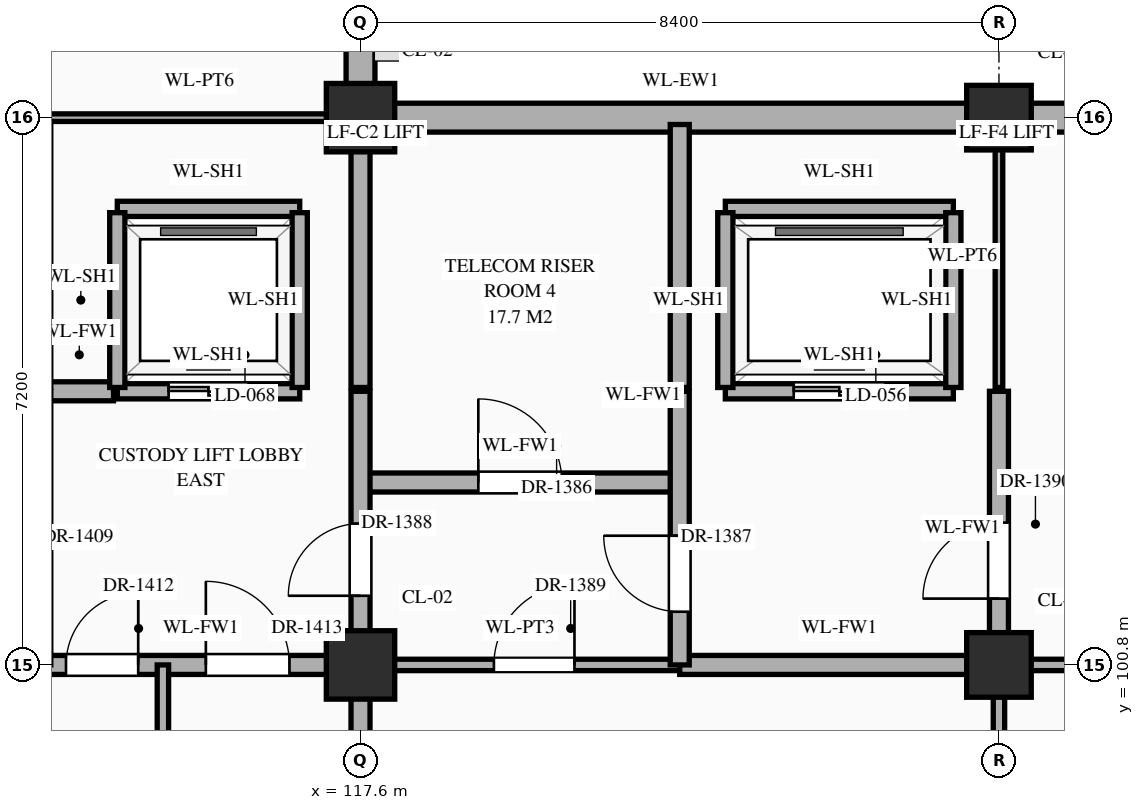
"""IFC4 building model, lengths in metres.
Left out: names, types, materials, properties, quantities, classifications, styles, units other than length and angle.
Written with IfcOpenShell. Run it as: python <this file> out.ifc"""

import sys

from ifc_helpers import new_model, si_unit, direction, frame, frame_2d, origin, origin_2d, place, context, subcontext, project, spatial, rectangle, extrude, element, fill, save


model = new_model("IFC4")
c1 = context("Model", 3, precision=1e-05, world=origin(), true_north=direction((0.0, 1.0)))
c2 = subcontext(c1, "Body", "Model", "MODEL_VIEW")
j1 = project(units=[si_unit("LENGTHUNIT", "METRE"), si_unit("PLANEANGLEUNIT", "RADIAN")], contexts=[c1])
p1 = place(None, origin())
s1 = spatial("IfcSite", under=j1, at=p1, CompositionType="ELEMENT")
p2 = place(p1, origin())
s2 = spatial("IfcBuilding", under=s1, at=p2, CompositionType="ELEMENT")
p3 = place(p2, frame((0.0, 0.0, 10.8)))
s3 = spatial("IfcBuildingStorey", under=s2, at=p3, CompositionType="ELEMENT", Elevation=10.8)
for number, where, z_axis, x_axis in (
    (1, (117.6, 100.8, 0.0), (0.0, 0.0, 1.0), (1.0, 0.0, 0.0)),
    (2, (117.6, 108.0, 0.0), (0.0, 0.0, 1.0), (1.0, 0.0, 0.0)),
):
    element("IfcColumn", number, at=place(p3, frame(where, z_axis=z_axis, x_axis=x_axis)), inside=s3, PredefinedType="COLUMN", context=c2, shape_type="SweptSolid", body=[
        extrude(rectangle(XDim=0.9, YDim=0.9, at=origin_2d()), origin(), (0.0, 0.0, 1.0), 5.4),
    ])
for number, where, z_axis, x_axis in (
    (3, (126.0, 100.8, 0.0), (0.0, 0.0, 1.0), (1.0, 0.0, 0.0)),
    (4, (126.0, 108.0, 0.0), (0.0, 0.0, 1.0), (1.0, 0.0, 0.0)),
):
    element("IfcColumn", number, at=place(p3, frame(where, z_axis=z_axis, x_axis=x_axis)), inside=s3, PredefinedType="COLUMN", context=c2, shape_type="SweptSolid", body=[
        extrude(rectangle(XDim=0.85, YDim=0.85, at=origin_2d()), origin(), (0.0, 0.0, 1.0), 5.4),
    ])
p4 = place(p3, frame((117.6, 108.445, 0.0), z_axis=(0.0, 0.0, 1.0), x_axis=(0.0, 1.0, 0.0)))
e5 = element("IfcWall", 5, at=p4, inside=s3, PredefinedType="STANDARD", context=c2, shape_type="SweptSolid", body=[
    extrude(rectangle(XDim=6.335, YDim=0.38, at=frame_2d((3.167, 0.0))), origin(), (0.0, 0.0, 1.0), 4.47),
])
p5 = place(p4, frame((3.855, 0.0, 0.85)))
e6 = element("IfcOpeningElement", 6, at=p5, cuts=e5, PredefinedType="OPENING", context=c2, shape_type="SweptSolid", body=[
    extrude(rectangle(XDim=1.2, YDim=1.56, at=frame_2d((0.6, 0.78))), frame((0.0, 0.202, 0.0), z_axis=(0.0, -1.0, 0.0), x_axis=(1.0, 0.0, 0.0)), (0.0, 0.0, 1.0), 0.404),
])
p6 = place(p3, frame((118.045, 108.0, 0.0), z_axis=(0.0, 0.0, 1.0), x_axis=(1.0, 0.0, 0.0)))
e7 = element("IfcWall", 7, at=p6, inside=s3, PredefinedType="STANDARD", context=c2, shape_type="SweptSolid", body=[
    extrude(rectangle(XDim=7.535, YDim=0.38, at=frame_2d((3.768, 0.0))), origin(), (0.0, 0.0, 1.0), 4.47),
])
p7 = place(p3, frame((126.42, 108.0, 0.0), z_axis=(0.0, 0.0, 1.0), x_axis=(1.0, 0.0, 0.0)))
e8 = element("IfcWall", 8, at=p7, inside=s3, PredefinedType="STANDARD", context=c2, shape_type="SweptSolid", body=[
    extrude(rectangle(XDim=7.56, YDim=0.38, at=frame_2d((3.78, 0.0))), origin(), (0.0, 0.0, 1.0), 4.47),
])
p8 = place(p7, frame((5.105, 0.0, 0.85)))
e9 = element("IfcOpeningElement", 9, at=p8, cuts=e8, PredefinedType="OPENING", context=c2, shape_type="SweptSolid", body=[
    extrude(rectangle(XDim=1.35, YDim=1.2, at=frame_2d((0.675, 0.6))), frame((0.0, 0.202, 0.0), z_axis=(0.0, -1.0, 0.0), x_axis=(1.0, 0.0, 0.0)), (0.0, 0.0, 1.0), 0.404),
])
p9 = place(p3, frame((113.4, 100.8, 0.0), z_axis=(0.0, 0.0, 1.0), x_axis=(1.0, 0.0, 0.0)))
e10 = element("IfcWall", 10, at=p9, inside=s3, PredefinedType="STANDARD", context=c2, shape_type="SweptSolid", body=[
    extrude(rectangle(XDim=4.2, YDim=0.25, at=frame_2d((2.1, 0.0))), origin(), (0.0, 0.0, 1.0), 4.27),
])
p10 = place(p9, frame((0.325, 0.0, 0.0)))
e11 = element("IfcOpeningElement", 11, at=p10, cuts=e10, PredefinedType="OPENING", context=c2, shape_type="SweptSolid", body=[
    extrude(rectangle(XDim=0.95, YDim=2.15, at=frame_2d((0.475, 1.075))), frame((0.0, 0.137, 0.0), z_axis=(0.0, -1.0, 0.0), x_axis=(1.0, 0.0, 0.0)), (0.0, 0.0, 1.0), 0.274),
])
p11 = place(p9, frame((2.165, 0.0, 0.0)))
e12 = element("IfcOpeningElement", 12, at=p11, cuts=e10, PredefinedType="OPENING", context=c2, shape_type="SweptSolid", body=[
    extrude(rectangle(XDim=1.1, YDim=2.2, at=frame_2d((0.55, 1.1))), frame((0.0, 0.137, 0.0), z_axis=(0.0, -1.0, 0.0), x_axis=(1.0, 0.0, 0.0)), (0.0, 0.0, 1.0), 0.274),
])
p12 = place(p3, frame((117.6, 100.8, 0.0), z_axis=(0.0, 0.0, 1.0), x_axis=(1.0, 0.0, 0.0)))
e13 = element("IfcWall", 13, at=p12, inside=s3, PredefinedType="STANDARD", context=c2, shape_type="SweptSolid", body=[
    extrude(rectangle(XDim=4.2, YDim=0.15, at=frame_2d((2.1, 0.0))), origin(), (0.0, 0.0, 1.0), 4.27),
])
p13 = place(p12, frame((1.755, 0.0, 0.0)))
e14 = element("IfcOpeningElement", 14, at=p13, cuts=e13, PredefinedType="OPENING", context=c2, shape_type="SweptSolid", body=[
    extrude(rectangle(XDim=1.06, YDim=2.4, at=frame_2d((0.53, 1.2))), frame((0.0, 0.087, 0.0), z_axis=(0.0, -1.0, 0.0), x_axis=(1.0, 0.0, 0.0)), (0.0, 0.0, 1.0), 0.174),
])
p14 = place(p3, frame((121.8, 100.8, 0.0), z_axis=(0.0, 0.0, 1.0), x_axis=(1.0, 0.0, 0.0)))
e15 = element("IfcWall", 15, at=p14, inside=s3, PredefinedType="STANDARD", context=c2, shape_type="SweptSolid", body=[
    extrude(rectangle(XDim=4.2, YDim=0.25, at=frame_2d((2.1, 0.0))), origin(), (0.0, 0.0, 1.0), 4.27),
])
p15 = place(p3, frame((126.0, 100.8, 0.0), z_axis=(0.0, 0.0, 1.0), x_axis=(1.0, 0.0, 0.0)))
e16 = element("IfcWall", 16, at=p15, inside=s3, PredefinedType="STANDARD", context=c2, shape_type="SweptSolid", body=[
    extrude(rectangle(XDim=8.4, YDim=0.15, at=frame_2d((4.2, 0.0))), origin(), (0.0, 0.0, 1.0), 4.27),
])
p16 = place(p15, frame((3.62, 0.0, 0.0)))
e17 = element("IfcOpeningElement", 17, at=p16, cuts=e16, PredefinedType="OPENING", context=c2, shape_type="SweptSolid", body=[
    extrude(rectangle(XDim=1.16, YDim=2.3, at=frame_2d((0.58, 1.15))), frame((0.0, 0.087, 0.0), z_axis=(0.0, -1.0, 0.0), x_axis=(1.0, 0.0, 0.0)), (0.0, 0.0, 1.0), 0.174),
])
p17 = place(p3, frame((117.6, 103.2, 0.0), z_axis=(0.0, 0.0, 1.0), x_axis=(1.0, 0.0, 0.0)))
e18 = element("IfcWall", 18, at=p17, inside=s3, PredefinedType="STANDARD", context=c2, shape_type="SweptSolid", body=[
    extrude(rectangle(XDim=4.2, YDim=0.25, at=frame_2d((2.1, 0.0))), origin(), (0.0, 0.0, 1.0), 5.12),
])
p18 = place(p17, frame((1.55, 0.0, 0.0)))
e19 = element("IfcOpeningElement", 19, at=p18, cuts=e18, PredefinedType="OPENING", context=c2, shape_type="SweptSolid", body=[
    extrude(rectangle(XDim=1.1, YDim=2.2, at=frame_2d((0.55, 1.1))), frame((0.0, 0.137, 0.0), z_axis=(0.0, -1.0, 0.0), x_axis=(1.0, 0.0, 0.0)), (0.0, 0.0, 1.0), 0.274),
])
p19 = place(p3, frame((126.0, 103.2, 0.0), z_axis=(0.0, 0.0, 1.0), x_axis=(1.0, 0.0, 0.0)))
e20 = element("IfcWall", 20, at=p19, inside=s3, PredefinedType="STANDARD", context=c2, shape_type="SweptSolid", body=[
    extrude(rectangle(XDim=41.96, YDim=0.1, at=frame_2d((20.98, 0.0))), origin(), (0.0, 0.0, 1.0), 5.12),
])
p20 = place(p19, frame((3.72, 0.0, 0.0)))
e21 = element("IfcOpeningElement", 21, at=p20, cuts=e20, PredefinedType="OPENING", context=c2, shape_type="SweptSolid", body=[
    extrude(rectangle(XDim=0.96, YDim=2.2, at=frame_2d((0.48, 1.1))), frame((0.0, 0.062, 0.0), z_axis=(0.0, -1.0, 0.0), x_axis=(1.0, 0.0, 0.0)), (0.0, 0.0, 1.0), 0.124),
])
p21 = place(p19, frame((12.1, 0.0, 0.0)))
e22 = element("IfcOpeningElement", 22, at=p21, cuts=e20, PredefinedType="OPENING", context=c2, shape_type="SweptSolid", body=[
    extrude(rectangle(XDim=1.0, YDim=2.25, at=frame_2d((0.5, 1.125))), frame((0.0, 0.062, 0.0), z_axis=(0.0, -1.0, 0.0), x_axis=(1.0, 0.0, 0.0)), (0.0, 0.0, 1.0), 0.124),
])
p22 = place(p19, frame((20.48, 0.0, 0.0)))
e23 = element("IfcOpeningElement", 23, at=p22, cuts=e20, PredefinedType="OPENING", context=c2, shape_type="SweptSolid", body=[
    extrude(rectangle(XDim=1.04, YDim=2.2, at=frame_2d((0.52, 1.1))), frame((0.0, 0.062, 0.0), z_axis=(0.0, -1.0, 0.0), x_axis=(1.0, 0.0, 0.0)), (0.0, 0.0, 1.0), 0.124),
])
p23 = place(p19, frame((28.86, 0.0, 0.0)))
e24 = element("IfcOpeningElement", 24, at=p23, cuts=e20, PredefinedType="OPENING", context=c2, shape_type="SweptSolid", body=[
    extrude(rectangle(XDim=1.08, YDim=2.25, at=frame_2d((0.54, 1.125))), frame((0.0, 0.062, 0.0), z_axis=(0.0, -1.0, 0.0), x_axis=(1.0, 0.0, 0.0)), (0.0, 0.0, 1.0), 0.124),
])
p24 = place(p19, frame((37.22, 0.0, 0.0)))
e25 = element("IfcOpeningElement", 25, at=p24, cuts=e20, PredefinedType="OPENING", context=c2, shape_type="SweptSolid", body=[
    extrude(rectangle(XDim=1.12, YDim=2.25, at=frame_2d((0.56, 1.125))), frame((0.0, 0.062, 0.0), z_axis=(0.0, -1.0, 0.0), x_axis=(1.0, 0.0, 0.0)), (0.0, 0.0, 1.0), 0.124),
])
p25 = place(p3, frame((113.45, 104.4, 0.0), z_axis=(0.0, 0.0, 1.0), x_axis=(1.0, 0.0, 0.0)))
e26 = element("IfcWall", 26, at=p25, inside=s3, PredefinedType="STANDARD", context=c2, shape_type="SweptSolid", body=[
    extrude(rectangle(XDim=0.9, YDim=0.25, at=frame_2d((0.45, 0.0))), origin(), (0.0, 0.0, 1.0), 5.12),
])
p26 = place(p3, frame((114.4, 104.4, 0.0), z_axis=(0.0, 0.0, 1.0), x_axis=(1.0, 0.0, 0.0)))
e27 = element("IfcWall", 27, at=p26, inside=s3, PredefinedType="STANDARD", context=c2, shape_type="SweptSolid", body=[
    extrude(rectangle(XDim=2.4, YDim=0.2, at=frame_2d((1.2, 0.0))), origin(), (0.0, 0.0, 1.0), 5.12),
])
p27 = place(p26, frame((0.675, 0.0, 0.0)))
e28 = element("IfcOpeningElement", 28, at=p27, cuts=e27, PredefinedType="OPENING", context=c2, shape_type="SweptSolid", body=[
    extrude(rectangle(XDim=1.05, YDim=2.15, at=frame_2d((0.525, 1.075))), frame((0.0, 0.112, 0.0), z_axis=(0.0, -1.0, 0.0), x_axis=(1.0, 0.0, 0.0)), (0.0, 0.0, 1.0), 0.224),
])
p28 = place(p3, frame((122.4, 104.4, 0.0), z_axis=(0.0, 0.0, 1.0), x_axis=(1.0, 0.0, 0.0)))
e29 = element("IfcWall", 29, at=p28, inside=s3, PredefinedType="STANDARD", context=c2, shape_type="SweptSolid", body=[
    extrude(rectangle(XDim=3.0, YDim=0.2, at=frame_2d((1.5, 0.0))), origin(), (0.0, 0.0, 1.0), 5.12),
])
p29 = place(p28, frame((0.9, 0.0, 0.0)))
e30 = element("IfcOpeningElement", 30, at=p29, cuts=e29, PredefinedType="OPENING", context=c2, shape_type="SweptSolid", body=[
    extrude(rectangle(XDim=1.2, YDim=2.15, at=frame_2d((0.6, 1.075))), frame((0.0, 0.112, 0.0), z_axis=(0.0, -1.0, 0.0), x_axis=(1.0, 0.0, 0.0)), (0.0, 0.0, 1.0), 0.224),
])
p30 = place(p3, frame((114.4, 106.8, 0.0), z_axis=(0.0, 0.0, 1.0), x_axis=(1.0, 0.0, 0.0)))
e31 = element("IfcWall", 31, at=p30, inside=s3, PredefinedType="STANDARD", context=c2, shape_type="SweptSolid", body=[
    extrude(rectangle(XDim=2.4, YDim=0.2, at=frame_2d((1.2, 0.0))), origin(), (0.0, 0.0, 1.0), 5.12),
])
p31 = place(p3, frame((122.4, 106.8, 0.0), z_axis=(0.0, 0.0, 1.0), x_axis=(1.0, 0.0, 0.0)))
e32 = element("IfcWall", 32, at=p31, inside=s3, PredefinedType="STANDARD", context=c2, shape_type="SweptSolid", body=[
    extrude(rectangle(XDim=3.0, YDim=0.2, at=frame_2d((1.5, 0.0))), origin(), (0.0, 0.0, 1.0), 5.12),
])
p32 = place(p3, frame((113.45, 108.0, 0.0), z_axis=(0.0, 0.0, 1.0), x_axis=(1.0, 0.0, 0.0)))
e33 = element("IfcWall", 33, at=p32, inside=s3, PredefinedType="STANDARD", context=c2, shape_type="SweptSolid", body=[
    extrude(rectangle(XDim=4.06, YDim=0.1, at=frame_2d((2.03, 0.0))), origin(), (0.0, 0.0, 1.0), 4.27),
])
p33 = place(p3, frame((114.4, 104.45, 0.0), z_axis=(0.0, 0.0, 1.0), x_axis=(0.0, 1.0, 0.0)))
e34 = element("IfcWall", 34, at=p33, inside=s3, PredefinedType="STANDARD", context=c2, shape_type="SweptSolid", body=[
    extrude(rectangle(XDim=2.3, YDim=0.2, at=frame_2d((1.15, 0.0))), origin(), (0.0, 0.0, 1.0), 5.12),
])
p34 = place(p3, frame((115.0, 96.0, 0.0), z_axis=(0.0, 0.0, 1.0), x_axis=(0.0, 1.0, 0.0)))
e35 = element("IfcWall", 35, at=p34, inside=s3, PredefinedType="STANDARD", context=c2, shape_type="SweptSolid", body=[
    extrude(rectangle(XDim=4.8, YDim=0.15, at=frame_2d((2.4, 0.0))), origin(), (0.0, 0.0, 1.0), 5.12),
])
p35 = place(p34, frame((1.82, 0.0, 0.0)))
e36 = element("IfcOpeningElement", 36, at=p35, cuts=e35, PredefinedType="OPENING", context=c2, shape_type="SweptSolid", body=[
    extrude(rectangle(XDim=1.16, YDim=2.3, at=frame_2d((0.58, 1.15))), frame((0.0, 0.087, 0.0), z_axis=(0.0, -1.0, 0.0), x_axis=(1.0, 0.0, 0.0)), (0.0, 0.0, 1.0), 0.174),
])
p36 = place(p3, frame((116.8, 104.45, 0.0), z_axis=(0.0, 0.0, 1.0), x_axis=(0.0, 1.0, 0.0)))
e37 = element("IfcWall", 37, at=p36, inside=s3, PredefinedType="STANDARD", context=c2, shape_type="SweptSolid", body=[
    extrude(rectangle(XDim=2.3, YDim=0.2, at=frame_2d((1.15, 0.0))), origin(), (0.0, 0.0, 1.0), 5.12),
])
p37 = place(p3, frame((117.6, 91.2, 0.0), z_axis=(0.0, 0.0, 1.0), x_axis=(0.0, 1.0, 0.0)))
e38 = element("IfcWall", 38, at=p37, inside=s3, PredefinedType="STANDARD", context=c2, shape_type="SweptSolid", body=[
    extrude(rectangle(XDim=13.2, YDim=0.25, at=frame_2d((6.6, 0.0))), origin(), (0.0, 0.0, 1.0), 4.37),
])
p38 = place(p37, frame((0.54, 0.0, 0.0)))
e39 = element("IfcOpeningElement", 39, at=p38, cuts=e38, PredefinedType="OPENING", context=c2, shape_type="SweptSolid", body=[
    extrude(rectangle(XDim=0.95, YDim=2.15, at=frame_2d((0.475, 1.075))), frame((0.0, 0.137, 0.0), z_axis=(0.0, -1.0, 0.0), x_axis=(1.0, 0.0, 0.0)), (0.0, 0.0, 1.0), 0.274),
])
p39 = place(p37, frame((10.51, 0.0, 0.0)))
e40 = element("IfcOpeningElement", 40, at=p39, cuts=e38, PredefinedType="OPENING", context=c2, shape_type="SweptSolid", body=[
    extrude(rectangle(XDim=0.95, YDim=2.15, at=frame_2d((0.475, 1.075))), frame((0.0, 0.137, 0.0), z_axis=(0.0, -1.0, 0.0), x_axis=(1.0, 0.0, 0.0)), (0.0, 0.0, 1.0), 0.274),
])
p40 = place(p37, frame((3.235, 0.0, 0.0)))
e41 = element("IfcOpeningElement", 41, at=p40, cuts=e38, PredefinedType="OPENING", context=c2, shape_type="SweptSolid", body=[
    extrude(rectangle(XDim=1.1, YDim=2.2, at=frame_2d((0.55, 1.1))), frame((0.0, 0.137, 0.0), z_axis=(0.0, -1.0, 0.0), x_axis=(1.0, 0.0, 0.0)), (0.0, 0.0, 1.0), 0.274),
])
p41 = place(p3, frame((117.6, 104.45, 0.0), z_axis=(0.0, 0.0, 1.0), x_axis=(0.0, 1.0, 0.0)))
e42 = element("IfcWall", 42, at=p41, inside=s3, PredefinedType="STANDARD", context=c2, shape_type="SweptSolid", body=[
    extrude(rectangle(XDim=3.46, YDim=0.25, at=frame_2d((1.73, 0.0))), origin(), (0.0, 0.0, 1.0), 4.37),
])
p42 = place(p3, frame((121.8, 100.8, 0.0), z_axis=(0.0, 0.0, 1.0), x_axis=(0.0, 1.0, 0.0)))
e43 = element("IfcWall", 43, at=p42, inside=s3, PredefinedType="STANDARD", context=c2, shape_type="SweptSolid", body=[
    extrude(rectangle(XDim=3.6, YDim=0.25, at=frame_2d((1.8, 0.0))), origin(), (0.0, 0.0, 1.0), 4.72),
])
p43 = place(p42, frame((0.7, 0.0, 0.0)))
e44 = element("IfcOpeningElement", 44, at=p43, cuts=e43, PredefinedType="OPENING", context=c2, shape_type="SweptSolid", body=[
    extrude(rectangle(XDim=1.0, YDim=2.2, at=frame_2d((0.5, 1.1))), frame((0.0, 0.137, 0.0), z_axis=(0.0, -1.0, 0.0), x_axis=(1.0, 0.0, 0.0)), (0.0, 0.0, 1.0), 0.274),
])
p44 = place(p3, frame((121.8, 104.45, 0.0), z_axis=(0.0, 0.0, 1.0), x_axis=(0.0, 1.0, 0.0)))
e45 = element("IfcWall", 45, at=p44, inside=s3, PredefinedType="STANDARD", context=c2, shape_type="SweptSolid", body=[
    extrude(rectangle(XDim=3.46, YDim=0.25, at=frame_2d((1.73, 0.0))), origin(), (0.0, 0.0, 1.0), 4.72),
])
for number, where, z_axis, x_axis in (
    (46, (122.4, 104.45, 0.0), (0.0, 0.0, 1.0), (0.0, 1.0, 0.0)),
    (47, (125.4, 104.45, 0.0), (0.0, 0.0, 1.0), (0.0, 1.0, 0.0)),
):
    element("IfcWall", number, at=place(p3, frame(where, z_axis=z_axis, x_axis=x_axis)), inside=s3, PredefinedType="STANDARD", context=c2, shape_type="SweptSolid", body=[
        extrude(rectangle(XDim=2.3, YDim=0.2, at=frame_2d((1.15, 0.0))), origin(), (0.0, 0.0, 1.0), 5.12),
    ])
p45 = place(p3, frame((126.0, 96.0, 0.0), z_axis=(0.0, 0.0, 1.0), x_axis=(0.0, 1.0, 0.0)))
e48 = element("IfcWall", 48, at=p45, inside=s3, PredefinedType="STANDARD", context=c2, shape_type="SweptSolid", body=[
    extrude(rectangle(XDim=4.8, YDim=0.15, at=frame_2d((2.4, 0.0))), origin(), (0.0, 0.0, 1.0), 4.37),
])
p46 = place(p3, frame((126.0, 100.8, 0.0), z_axis=(0.0, 0.0, 1.0), x_axis=(0.0, 1.0, 0.0)))
e49 = element("IfcWall", 49, at=p46, inside=s3, PredefinedType="STANDARD", context=c2, shape_type="SweptSolid", body=[
    extrude(rectangle(XDim=3.6, YDim=0.25, at=frame_2d((1.8, 0.0))), origin(), (0.0, 0.0, 1.0), 4.37),
])
p47 = place(p46, frame((0.873, 0.0, 0.0)))
e50 = element("IfcOpeningElement", 50, at=p47, cuts=e49, PredefinedType="OPENING", context=c2, shape_type="SweptSolid", body=[
    extrude(rectangle(XDim=1.0, YDim=2.2, at=frame_2d((0.5, 1.1))), frame((0.0, 0.137, 0.0), z_axis=(0.0, -1.0, 0.0), x_axis=(1.0, 0.0, 0.0)), (0.0, 0.0, 1.0), 0.274),
])
p48 = place(p3, frame((126.0, 104.45, 0.0), z_axis=(0.0, 0.0, 1.0), x_axis=(0.0, 1.0, 0.0)))
e51 = element("IfcWall", 51, at=p48, inside=s3, PredefinedType="STANDARD", context=c2, shape_type="SweptSolid", body=[
    extrude(rectangle(XDim=3.46, YDim=0.1, at=frame_2d((1.73, 0.0))), origin(), (0.0, 0.0, 1.0), 4.37),
])
p49 = place(p29, origin())
e52 = element("IfcDoor", 52, at=p49, inside=s3, OperationType="DOUBLE_DOOR_SLIDING", PredefinedType="DOOR", context=c2, shape_type="SweptSolid", body=[
    extrude(rectangle(XDim=1.2, YDim=2.15, at=frame_2d((0.6, 1.075))), frame((0.0, 0.025, 0.0), z_axis=(0.0, -1.0, 0.0), x_axis=(1.0, 0.0, 0.0)), (0.0, 0.0, 1.0), 0.05),
])
fill(e30, e52)
p50 = place(p27, origin())
e53 = element("IfcDoor", 53, at=p50, inside=s3, OperationType="DOUBLE_DOOR_SLIDING", PredefinedType="DOOR", context=c2, shape_type="SweptSolid", body=[
    extrude(rectangle(XDim=1.05, YDim=2.15, at=frame_2d((0.525, 1.075))), frame((0.0, 0.025, 0.0), z_axis=(0.0, -1.0, 0.0), x_axis=(1.0, 0.0, 0.0)), (0.0, 0.0, 1.0), 0.05),
])
fill(e28, e53)
p51 = place(p18, origin())
e54 = element("IfcDoor", 54, at=p51, inside=s3, OperationType="SINGLE_SWING_LEFT", PredefinedType="DOOR", context=c2, shape_type="SweptSolid", body=[
    extrude(rectangle(XDim=1.1, YDim=2.2, at=frame_2d((0.55, 1.1))), frame((0.0, 0.025, 0.0), z_axis=(0.0, -1.0, 0.0), x_axis=(1.0, 0.0, 0.0)), (0.0, 0.0, 1.0), 0.05),
])
fill(e19, e54)
p52 = place(p43, origin())
e55 = element("IfcDoor", 55, at=p52, inside=s3, OperationType="SINGLE_SWING_RIGHT", PredefinedType="DOOR", context=c2, shape_type="SweptSolid", body=[
    extrude(rectangle(XDim=1.0, YDim=2.2, at=frame_2d((0.5, 1.1))), frame((0.0, 0.025, 0.0), z_axis=(0.0, -1.0, 0.0), x_axis=(1.0, 0.0, 0.0)), (0.0, 0.0, 1.0), 0.05),
])
fill(e44, e55)
p53 = place(p39, origin())
e56 = element("IfcDoor", 56, at=p53, inside=s3, OperationType="SINGLE_SWING_LEFT", PredefinedType="DOOR", context=c2, shape_type="SweptSolid", body=[
    extrude(rectangle(XDim=0.95, YDim=2.15, at=frame_2d((0.475, 1.075))), frame((0.0, 0.025, 0.0), z_axis=(0.0, -1.0, 0.0), x_axis=(1.0, 0.0, 0.0)), (0.0, 0.0, 1.0), 0.05),
])
fill(e40, e56)
p54 = place(p13, origin())
e57 = element("IfcDoor", 57, at=p54, inside=s3, OperationType="SINGLE_SWING_RIGHT", PredefinedType="DOOR", context=c2, shape_type="SweptSolid", body=[
    extrude(rectangle(XDim=1.06, YDim=2.4, at=frame_2d((0.53, 1.2))), frame((0.0, 0.025, 0.0), z_axis=(0.0, -1.0, 0.0), x_axis=(1.0, 0.0, 0.0)), (0.0, 0.0, 1.0), 0.05),
])
fill(e14, e57)
p55 = place(p47, origin())
e58 = element("IfcDoor", 58, at=p55, inside=s3, OperationType="SINGLE_SWING_LEFT", PredefinedType="DOOR", context=c2, shape_type="SweptSolid", body=[
    extrude(rectangle(XDim=1.0, YDim=2.2, at=frame_2d((0.5, 1.1))), frame((0.0, 0.025, 0.0), z_axis=(0.0, -1.0, 0.0), x_axis=(1.0, 0.0, 0.0)), (0.0, 0.0, 1.0), 0.05),
])
fill(e50, e58)
p56 = place(p10, origin())
e59 = element("IfcDoor", 59, at=p56, inside=s3, OperationType="SINGLE_SWING_RIGHT", PredefinedType="DOOR", context=c2, shape_type="SweptSolid", body=[
    extrude(rectangle(XDim=0.95, YDim=2.15, at=frame_2d((0.475, 1.075))), frame((0.0, 0.025, 0.0), z_axis=(0.0, -1.0, 0.0), x_axis=(1.0, 0.0, 0.0)), (0.0, 0.0, 1.0), 0.05),
])
fill(e11, e59)
p57 = place(p11, origin())
e60 = element("IfcDoor", 60, at=p57, inside=s3, OperationType="SINGLE_SWING_LEFT", PredefinedType="DOOR", context=c2, shape_type="SweptSolid", body=[
    extrude(rectangle(XDim=1.1, YDim=2.2, at=frame_2d((0.55, 1.1))), frame((0.0, 0.025, 0.0), z_axis=(0.0, -1.0, 0.0), x_axis=(1.0, 0.0, 0.0)), (0.0, 0.0, 1.0), 0.05),
])
fill(e12, e60)
save(model, sys.argv[1])
